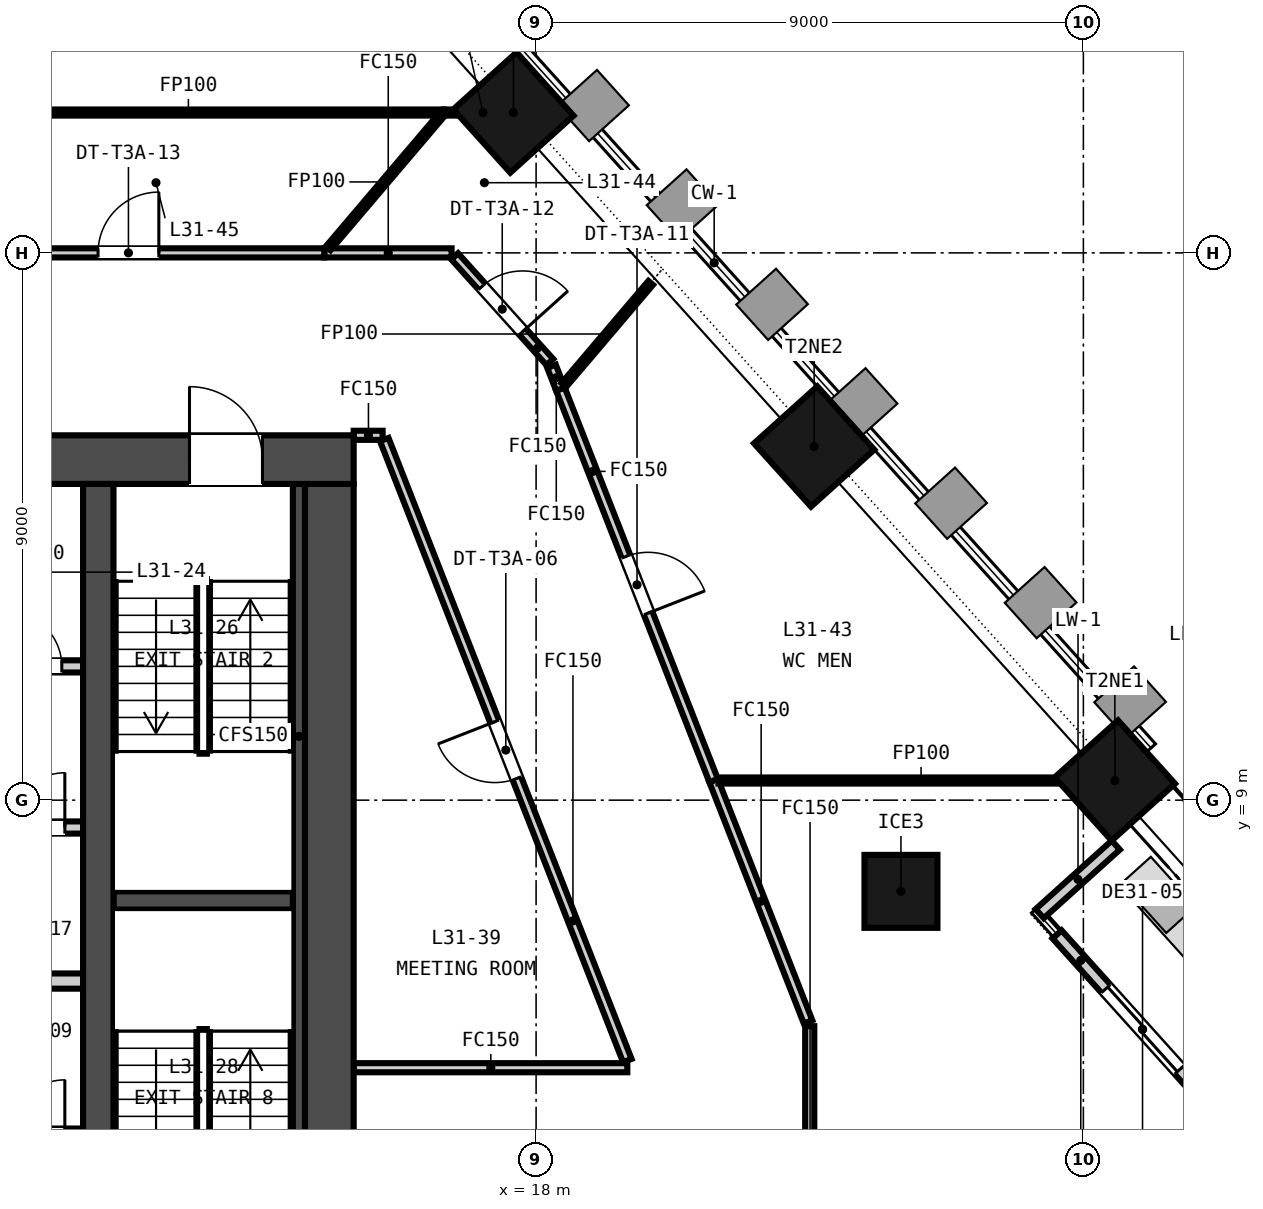
"""IFC4 building model, lengths in metres.
Left out: names, types, materials, properties, quantities, classifications, styles, units other than length and angle.
Written with IfcOpenShell. Run it as: python <this file> out.ifc"""

import sys

from ifc_helpers import new_model, si_unit, direction, frame, frame_2d, origin, origin_2d, place, context, subcontext, project, spatial, rectangle, extrude, element, fill, save


model = new_model("IFC4")
c1 = context("Model", 3, precision=1e-05, world=origin(), true_north=direction((0.0, 1.0)))
c2 = subcontext(c1, "Body", "Model", "MODEL_VIEW")
j1 = project(units=[si_unit("LENGTHUNIT", "METRE"), si_unit("PLANEANGLEUNIT", "RADIAN")], contexts=[c1])
p1 = place(None, origin())
s1 = spatial("IfcSite", under=j1, at=p1, CompositionType="ELEMENT")
p2 = place(p1, origin())
s2 = spatial("IfcBuilding", under=s1, at=p2, CompositionType="ELEMENT")
p3 = place(p2, frame((0.0, 0.0, 129.8)))
s3 = spatial("IfcBuildingStorey", under=s2, at=p3, CompositionType="ELEMENT", Elevation=129.8)
p4 = place(p3, frame((-15.0, 14.6, -0.15), z_axis=(0.0, 0.0, 1.0), x_axis=(1.0, 0.0, 0.0)))
e1 = element("IfcWall", 1, at=p4, inside=s3, PredefinedType="SOLIDWALL", context=c2, shape_type="SweptSolid", body=[
    extrude(rectangle(XDim=30.0, YDim=0.8, at=frame_2d((15.0, 0.0))), origin(), (0.0, 0.0, 1.0), 3.65),
])
p5 = place(p4, frame((9.25, 0.0, 0.15)))
e2 = element("IfcOpeningElement", 2, at=p5, cuts=e1, PredefinedType="OPENING", context=c2, shape_type="SweptSolid", body=[
    extrude(rectangle(XDim=1.5, YDim=2.1, at=frame_2d((0.75, 1.05))), frame((0.0, 0.41, 0.0), z_axis=(0.0, -1.0, 0.0), x_axis=(1.0, 0.0, 0.0)), (0.0, 0.0, 1.0), 0.82),
])
p6 = place(p4, frame((19.4, 0.0, 0.15)))
e3 = element("IfcOpeningElement", 3, at=p6, cuts=e1, PredefinedType="OPENING", context=c2, shape_type="SweptSolid", body=[
    extrude(rectangle(XDim=1.5, YDim=2.1, at=frame_2d((0.75, 1.05))), frame((0.0, 0.41, 0.0), z_axis=(0.0, -1.0, 0.0), x_axis=(1.0, 0.0, 0.0)), (0.0, 0.0, 1.0), 0.82),
])
p7 = place(p4, frame((1.5, 0.0, 0.15)))
e4 = element("IfcOpeningElement", 4, at=p7, cuts=e1, PredefinedType="OPENING", context=c2, shape_type="SweptSolid", body=[
    extrude(rectangle(XDim=1.2, YDim=2.1, at=frame_2d((0.6, 1.05))), frame((0.0, 0.41, 0.0), z_axis=(0.0, -1.0, 0.0), x_axis=(1.0, 0.0, 0.0)), (0.0, 0.0, 1.0), 0.82),
])
p8 = place(p4, frame((27.3, 0.0, 0.15)))
e5 = element("IfcOpeningElement", 5, at=p8, cuts=e1, PredefinedType="OPENING", context=c2, shape_type="SweptSolid", body=[
    extrude(rectangle(XDim=1.2, YDim=2.1, at=frame_2d((0.6, 1.05))), frame((0.0, 0.41, 0.0), z_axis=(0.0, -1.0, 0.0), x_axis=(1.0, 0.0, 0.0)), (0.0, 0.0, 1.0), 0.82),
])
p9 = place(p3, frame((14.6, 0.8, -0.15), z_axis=(0.0, 0.0, 1.0), x_axis=(0.0, 1.0, 0.0)))
e6 = element("IfcWall", 6, at=p9, inside=s3, PredefinedType="SOLIDWALL", context=c2, shape_type="SweptSolid", body=[
    extrude(rectangle(XDim=13.4, YDim=0.8, at=frame_2d((6.7, 0.0))), origin(), (0.0, 0.0, 1.0), 3.65),
])
p10 = place(p3, frame((10.8, 0.8, -0.15), z_axis=(0.0, 0.0, 1.0), x_axis=(0.0, 1.0, 0.0)))
e7 = element("IfcWall", 7, at=p10, inside=s3, PredefinedType="SOLIDWALL", context=c2, shape_type="SweptSolid", body=[
    extrude(rectangle(XDim=13.4, YDim=0.5, at=frame_2d((6.7, 0.0))), origin(), (0.0, 0.0, 1.0), 3.65),
])
for number, where, z_axis, x_axis in (
    (8, (27.518, 9.323, -0.15), (0.0, 0.0, 1.0), (-0.669, 0.743, 0.0)),
    (9, (22.573, 14.816, -0.15), (0.0, 0.0, 1.0), (-0.669, 0.743, 0.0)),
    (10, (17.627, 20.308, -0.15), (0.0, 0.0, 1.0), (-0.669, 0.743, 0.0)),
):
    element("IfcColumn", number, at=place(p3, frame(where, z_axis=z_axis, x_axis=x_axis)), inside=s3, PredefinedType="COLUMN", context=c2, shape_type="SweptSolid", body=[
        extrude(rectangle(XDim=1.4, YDim=1.4, at=origin_2d()), origin(), (0.0, 0.0, 1.0), 3.65),
    ])
p11 = place(p3, frame((24.0, 7.5, -0.15), z_axis=(0.0, 0.0, 1.0), x_axis=(1.0, 0.0, 0.0)))
e11 = element("IfcColumn", 11, at=p11, inside=s3, PredefinedType="COLUMN", context=c2, shape_type="SweptSolid", body=[
    extrude(rectangle(XDim=1.2, YDim=1.2, at=origin_2d()), origin(), (0.0, 0.0, 1.0), 3.65),
])
p12 = place(p3, frame((29.378, 3.67, 0.0), z_axis=(0.0, 0.0, 1.0), x_axis=(-0.669109235636, 0.743164067206, 0.0)))
e12 = element("IfcWall", 12, at=p12, inside=s3, PredefinedType="SOLIDWALL", context=c2, shape_type="SweptSolid", body=[
    extrude(rectangle(XDim=4.2, YDim=0.2, at=frame_2d((2.1, 0.0))), origin(), (0.0, 0.0, 1.0), 2.9),
])
p13 = place(p12, frame((1.2, 0.0, 0.0)))
e13 = element("IfcOpeningElement", 13, at=p13, cuts=e12, PredefinedType="OPENING", context=c2, shape_type="SweptSolid", body=[
    extrude(rectangle(XDim=1.8, YDim=2.4, at=frame_2d((0.9, 1.2))), frame((0.0, 0.11, 0.0), z_axis=(0.0, -1.0, 0.0), x_axis=(1.0, 0.0, 0.0)), (0.0, 0.0, 1.0), 0.22),
])
p14 = place(p3, frame((27.533, 8.26, 0.0), z_axis=(0.0, 0.0, 1.0), x_axis=(-0.743106699699, -0.6691729469, 0.0)))
e14 = element("IfcWall", 14, at=p14, inside=s3, PredefinedType="SOLIDWALL", context=c2, shape_type="SweptSolid", body=[
    extrude(rectangle(XDim=1.684, YDim=0.2, at=frame_2d((0.842, 0.0))), origin(), (0.0, 0.0, 1.0), 2.967),
])
p15 = place(p3, frame((-10.55, 6.025, 0.0), z_axis=(0.0, 0.0, 1.0), x_axis=(1.0, 0.0, 0.0)))
e15 = element("IfcWall", 15, at=p15, inside=s3, PredefinedType="PARTITIONING", context=c2, shape_type="SweptSolid", body=[
    extrude(rectangle(XDim=21.1, YDim=0.25, at=frame_2d((10.55, 0.0))), origin(), (0.0, 0.0, 1.0), 3.5),
])
p16 = place(p3, frame((-10.55, 8.55, 0.0), z_axis=(0.0, 0.0, 1.0), x_axis=(1.0, 0.0, 0.0)))
e16 = element("IfcWall", 16, at=p16, inside=s3, PredefinedType="PARTITIONING", context=c2, shape_type="SweptSolid", body=[
    extrude(rectangle(XDim=21.1, YDim=0.2, at=frame_2d((10.55, 0.0))), origin(), (0.0, 0.0, 1.0), 3.5),
])
p17 = place(p16, frame((0.675, 0.0, 0.0)))
e17 = element("IfcOpeningElement", 17, at=p17, cuts=e16, PredefinedType="OPENING", context=c2, shape_type="SweptSolid", body=[
    extrude(rectangle(XDim=1.2, YDim=2.1, at=frame_2d((0.6, 1.05))), frame((0.0, 0.11, 0.0), z_axis=(0.0, -1.0, 0.0), x_axis=(1.0, 0.0, 0.0)), (0.0, 0.0, 1.0), 0.22),
])
p18 = place(p16, frame((3.475, 0.0, 0.0)))
e18 = element("IfcOpeningElement", 18, at=p18, cuts=e16, PredefinedType="OPENING", context=c2, shape_type="SweptSolid", body=[
    extrude(rectangle(XDim=1.2, YDim=2.1, at=frame_2d((0.6, 1.05))), frame((0.0, 0.11, 0.0), z_axis=(0.0, -1.0, 0.0), x_axis=(1.0, 0.0, 0.0)), (0.0, 0.0, 1.0), 0.22),
])
p19 = place(p16, frame((6.275, 0.0, 0.0)))
e19 = element("IfcOpeningElement", 19, at=p19, cuts=e16, PredefinedType="OPENING", context=c2, shape_type="SweptSolid", body=[
    extrude(rectangle(XDim=1.2, YDim=2.1, at=frame_2d((0.6, 1.05))), frame((0.0, 0.11, 0.0), z_axis=(0.0, -1.0, 0.0), x_axis=(1.0, 0.0, 0.0)), (0.0, 0.0, 1.0), 0.22),
])
p20 = place(p16, frame((9.075, 0.0, 0.0)))
e20 = element("IfcOpeningElement", 20, at=p20, cuts=e16, PredefinedType="OPENING", context=c2, shape_type="SweptSolid", body=[
    extrude(rectangle(XDim=1.2, YDim=2.1, at=frame_2d((0.6, 1.05))), frame((0.0, 0.11, 0.0), z_axis=(0.0, -1.0, 0.0), x_axis=(1.0, 0.0, 0.0)), (0.0, 0.0, 1.0), 0.22),
])
p21 = place(p16, frame((11.875, 0.0, 0.0)))
e21 = element("IfcOpeningElement", 21, at=p21, cuts=e16, PredefinedType="OPENING", context=c2, shape_type="SweptSolid", body=[
    extrude(rectangle(XDim=1.2, YDim=2.1, at=frame_2d((0.6, 1.05))), frame((0.0, 0.11, 0.0), z_axis=(0.0, -1.0, 0.0), x_axis=(1.0, 0.0, 0.0)), (0.0, 0.0, 1.0), 0.22),
])
p22 = place(p16, frame((14.675, 0.0, 0.0)))
e22 = element("IfcOpeningElement", 22, at=p22, cuts=e16, PredefinedType="OPENING", context=c2, shape_type="SweptSolid", body=[
    extrude(rectangle(XDim=1.2, YDim=2.1, at=frame_2d((0.6, 1.05))), frame((0.0, 0.11, 0.0), z_axis=(0.0, -1.0, 0.0), x_axis=(1.0, 0.0, 0.0)), (0.0, 0.0, 1.0), 0.22),
])
p23 = place(p16, frame((17.475, 0.0, 0.0)))
e23 = element("IfcOpeningElement", 23, at=p23, cuts=e16, PredefinedType="OPENING", context=c2, shape_type="SweptSolid", body=[
    extrude(rectangle(XDim=1.2, YDim=2.1, at=frame_2d((0.6, 1.05))), frame((0.0, 0.11, 0.0), z_axis=(0.0, -1.0, 0.0), x_axis=(1.0, 0.0, 0.0)), (0.0, 0.0, 1.0), 0.22),
])
p24 = place(p16, frame((19.9, 0.0, 0.0)))
e24 = element("IfcOpeningElement", 24, at=p24, cuts=e16, PredefinedType="OPENING", context=c2, shape_type="SweptSolid", body=[
    extrude(rectangle(XDim=0.9, YDim=2.1, at=frame_2d((0.45, 1.05))), frame((0.0, 0.11, 0.0), z_axis=(0.0, -1.0, 0.0), x_axis=(1.0, 0.0, 0.0)), (0.0, 0.0, 1.0), 0.22),
])
p25 = place(p3, frame((5.9, 11.2, 0.0), z_axis=(0.0, 0.0, 1.0), x_axis=(1.0, 0.0, 0.0)))
e25 = element("IfcWall", 25, at=p25, inside=s3, PredefinedType="PARTITIONING", context=c2, shape_type="SweptSolid", body=[
    extrude(rectangle(XDim=4.65, YDim=0.2, at=frame_2d((2.325, 0.0))), origin(), (0.0, 0.0, 1.0), 3.5),
])
p26 = place(p25, frame((3.4, 0.0, 0.0)))
e26 = element("IfcOpeningElement", 26, at=p26, cuts=e25, PredefinedType="OPENING", context=c2, shape_type="SweptSolid", body=[
    extrude(rectangle(XDim=0.9, YDim=2.1, at=frame_2d((0.45, 1.05))), frame((0.0, 0.11, 0.0), z_axis=(0.0, -1.0, 0.0), x_axis=(1.0, 0.0, 0.0)), (0.0, 0.0, 1.0), 0.22),
])
p27 = place(p3, frame((11.05, 7.35, 0.0), z_axis=(0.0, 0.0, 1.0), x_axis=(1.0, 0.0, 0.0)))
e27 = element("IfcWall", 27, at=p27, inside=s3, PredefinedType="SOLIDWALL", context=c2, shape_type="SweptSolid", body=[
    extrude(rectangle(XDim=2.95, YDim=0.3, at=frame_2d((1.475, 0.0))), origin(), (0.0, 0.0, 1.0), 3.5),
])
p28 = place(p3, frame((14.1, 0.8, 0.0), z_axis=(0.0, 0.0, 1.0), x_axis=(0.0, 1.0, 0.0)))
e28 = element("IfcWall", 28, at=p28, inside=s3, PredefinedType="SOLIDWALL", context=c2, shape_type="SweptSolid", body=[
    extrude(rectangle(XDim=13.4, YDim=0.2, at=frame_2d((6.7, 0.0))), origin(), (0.0, 0.0, 1.0), 3.5),
])
p29 = place(p3, frame((15.476, 15.0, 0.0), z_axis=(0.0, 0.0, 1.0), x_axis=(-1.0, 0.0, 0.0)))
e29 = element("IfcWall", 29, at=p29, inside=s3, PredefinedType="PARTITIONING", context=c2, shape_type="SweptSolid", body=[
    extrude(rectangle(XDim=0.476, YDim=0.15, at=frame_2d((0.238, 0.0))), origin(), (0.0, 0.0, 1.0), 2.741),
])
p30 = place(p3, frame((19.5, 4.717, 0.0), z_axis=(0.0, 0.0, 1.0), x_axis=(-0.364410260026, 0.931238509936, 0.0)))
e30 = element("IfcWall", 30, at=p30, inside=s3, PredefinedType="PARTITIONING", context=c2, shape_type="SweptSolid", body=[
    extrude(rectangle(XDim=10.967, YDim=0.15, at=frame_2d((5.484, 0.0))), origin(), (0.0, 0.0, 1.0), 2.741),
])
p31 = place(p30, frame((4.984, 0.0, 0.0)))
e31 = element("IfcOpeningElement", 31, at=p31, cuts=e30, PredefinedType="OPENING", context=c2, shape_type="SweptSolid", body=[
    extrude(rectangle(XDim=1.0, YDim=2.1, at=frame_2d((0.5, 1.05))), frame((0.0, 0.085, 0.0), z_axis=(0.0, -1.0, 0.0), x_axis=(1.0, 0.0, 0.0)), (0.0, 0.0, 1.0), 0.17),
])
p32 = place(p3, frame((22.5, 5.283, 0.0), z_axis=(0.0, 0.0, 1.0), x_axis=(0.0, -1.0, 0.0)))
e32 = element("IfcWall", 32, at=p32, inside=s3, PredefinedType="PARTITIONING", context=c2, shape_type="SweptSolid", body=[
    extrude(rectangle(XDim=5.283, YDim=0.15, at=frame_2d((2.642, 0.0))), origin(), (0.0, 0.0, 1.0), 2.741),
])
p33 = place(p3, frame((16.479, 20.308, 0.0), z_axis=(0.0, 0.0, 1.0), x_axis=(1.0, 0.0, 0.0)))
e33 = element("IfcWall", 33, at=p33, inside=s3, PredefinedType="PARTITIONING", context=c2, shape_type="SweptSolid", body=[
    extrude(rectangle(XDim=1.283, YDim=0.1, at=frame_2d((0.642, 0.0))), origin(), (0.0, 0.0, 1.0), 2.741),
])
p34 = place(p3, frame((8.075, 20.308, 0.0), z_axis=(0.0, 0.0, 1.0), x_axis=(1.0, 0.0, 0.0)))
e34 = element("IfcWall", 34, at=p34, inside=s3, PredefinedType="PARTITIONING", context=c2, shape_type="SweptSolid", body=[
    extrude(rectangle(XDim=8.404, YDim=0.1, at=frame_2d((4.202, 0.0))), origin(), (0.0, 0.0, 1.0), 2.741),
])
p35 = place(p3, frame((15.0, 4.6, 0.0), z_axis=(0.0, 0.0, 1.0), x_axis=(1.0, 0.0, 0.0)))
e35 = element("IfcWall", 35, at=p35, inside=s3, PredefinedType="PARTITIONING", context=c2, shape_type="SweptSolid", body=[
    extrude(rectangle(XDim=4.5, YDim=0.15, at=frame_2d((2.25, 0.0))), origin(), (0.0, 0.0, 1.0), 2.741),
])
p36 = place(p3, frame((20.919, 9.323, 0.0), z_axis=(0.0, 0.0, 1.0), x_axis=(0.364429576393, -0.931230950865, 0.0)))
e36 = element("IfcWall", 36, at=p36, inside=s3, PredefinedType="PARTITIONING", context=c2, shape_type="SweptSolid", body=[
    extrude(rectangle(XDim=4.263, YDim=0.15, at=frame_2d((2.132, 0.0))), origin(), (0.0, 0.0, 1.0), 2.741),
])
p37 = place(p3, frame((18.4, 15.76, 0.0), z_axis=(0.0, 0.0, 1.0), x_axis=(0.364425982763, -0.931232357195, 0.0)))
e37 = element("IfcWall", 37, at=p37, inside=s3, PredefinedType="PARTITIONING", context=c2, shape_type="SweptSolid", body=[
    extrude(rectangle(XDim=6.912, YDim=0.15, at=frame_2d((3.456, 0.0))), origin(), (0.0, 0.0, 1.0), 2.741),
])
p38 = place(p37, frame((2.956, 0.0, 0.0)))
e38 = element("IfcOpeningElement", 38, at=p38, cuts=e37, PredefinedType="OPENING", context=c2, shape_type="SweptSolid", body=[
    extrude(rectangle(XDim=1.0, YDim=2.1, at=frame_2d((0.5, 1.05))), frame((0.0, 0.085, 0.0), z_axis=(0.0, -1.0, 0.0), x_axis=(1.0, 0.0, 0.0)), (0.0, 0.0, 1.0), 0.17),
])
p39 = place(p3, frame((21.0, 9.323, 0.0), z_axis=(0.0, 0.0, 1.0), x_axis=(1.0, 0.0, 0.0)))
e39 = element("IfcWall", 39, at=p39, inside=s3, PredefinedType="PARTITIONING", context=c2, shape_type="SweptSolid", body=[
    extrude(rectangle(XDim=6.653, YDim=0.1, at=frame_2d((3.326, 0.0))), origin(), (0.0, 0.0, 1.0), 2.741),
])
p40 = place(p3, frame((14.517, 18.0, 0.0), z_axis=(0.0, 0.0, 1.0), x_axis=(1.0, 0.0, 0.0)))
e40 = element("IfcWall", 40, at=p40, inside=s3, PredefinedType="PARTITIONING", context=c2, shape_type="SweptSolid", body=[
    extrude(rectangle(XDim=2.093, YDim=0.15, at=frame_2d((1.046, 0.0))), origin(), (0.0, 0.0, 1.0), 2.741),
])
p41 = place(p3, frame((16.66, 17.944, 0.0), z_axis=(0.0, 0.0, 1.0), x_axis=(0.669103043777, -0.743169642012, 0.0)))
e41 = element("IfcWall", 41, at=p41, inside=s3, PredefinedType="PARTITIONING", context=c2, shape_type="SweptSolid", body=[
    extrude(rectangle(XDim=2.34, YDim=0.15, at=frame_2d((1.17, 0.0))), origin(), (0.0, 0.0, 1.0), 2.741),
])
p42 = place(p41, frame((0.67, 0.0, 0.0)))
e42 = element("IfcOpeningElement", 42, at=p42, cuts=e41, PredefinedType="OPENING", context=c2, shape_type="SweptSolid", body=[
    extrude(rectangle(XDim=1.0, YDim=2.1, at=frame_2d((0.5, 1.05))), frame((0.0, 0.085, 0.0), z_axis=(0.0, -1.0, 0.0), x_axis=(1.0, 0.0, 0.0)), (0.0, 0.0, 1.0), 0.17),
])
p43 = place(p3, frame((18.253, 16.135, 0.0), z_axis=(0.0, 0.0, 1.0), x_axis=(0.36385052714, -0.93145734948, 0.0)))
e43 = element("IfcWall", 43, at=p43, inside=s3, PredefinedType="PARTITIONING", context=c2, shape_type="SweptSolid", body=[
    extrude(rectangle(XDim=0.403, YDim=0.15, at=frame_2d((0.201, 0.0))), origin(), (0.0, 0.0, 1.0), 2.741),
])
p44 = place(p3, frame((18.455, 15.825, 0.0), z_axis=(0.0, 0.0, 1.0), x_axis=(0.647780060511, 0.761827403815, 0.0)))
e44 = element("IfcWall", 44, at=p44, inside=s3, PredefinedType="PARTITIONING", context=c2, shape_type="SweptSolid", body=[
    extrude(rectangle(XDim=2.207, YDim=0.1, at=frame_2d((1.104, 0.0))), origin(), (0.0, 0.0, 1.0), 2.741),
])
p45 = place(p3, frame((8.075, 18.0, 0.0), z_axis=(0.0, 0.0, 1.0), x_axis=(1.0, 0.0, 0.0)))
e45 = element("IfcWall", 45, at=p45, inside=s3, PredefinedType="PARTITIONING", context=c2, shape_type="SweptSolid", body=[
    extrude(rectangle(XDim=6.442, YDim=0.15, at=frame_2d((3.221, 0.0))), origin(), (0.0, 0.0, 1.0), 2.741),
])
p46 = place(p45, frame((2.721, 0.0, 0.0)))
e46 = element("IfcOpeningElement", 46, at=p46, cuts=e45, PredefinedType="OPENING", context=c2, shape_type="SweptSolid", body=[
    extrude(rectangle(XDim=1.0, YDim=2.1, at=frame_2d((0.5, 1.05))), frame((0.0, 0.085, 0.0), z_axis=(0.0, -1.0, 0.0), x_axis=(1.0, 0.0, 0.0)), (0.0, 0.0, 1.0), 0.17),
])
p47 = place(p3, frame((14.581, 18.075, 0.0), z_axis=(0.0, 0.0, 1.0), x_axis=(0.6476632602, 0.761926703422, 0.0)))
e47 = element("IfcWall", 47, at=p47, inside=s3, PredefinedType="PARTITIONING", context=c2, shape_type="SweptSolid", body=[
    extrude(rectangle(XDim=2.865, YDim=0.1, at=frame_2d((1.433, 0.0))), origin(), (0.0, 0.0, 1.0), 2.741),
])
p48 = place(p13, origin())
e48 = element("IfcDoor", 48, at=p48, inside=s3, OperationType="SINGLE_SWING_LEFT", PredefinedType="DOOR", context=c2, shape_type="SweptSolid", body=[
    extrude(rectangle(XDim=1.8, YDim=2.4, at=frame_2d((0.9, 1.2))), frame((0.0, 0.025, 0.0), z_axis=(0.0, -1.0, 0.0), x_axis=(1.0, 0.0, 0.0)), (0.0, 0.0, 1.0), 0.05),
])
fill(e13, e48)
p49 = place(p24, origin())
e49 = element("IfcDoor", 49, at=p49, inside=s3, OperationType="SINGLE_SWING_RIGHT", PredefinedType="DOOR", context=c2, shape_type="SweptSolid", body=[
    extrude(rectangle(XDim=0.9, YDim=2.1, at=frame_2d((0.45, 1.05))), frame((0.0, 0.025, 0.0), z_axis=(0.0, -1.0, 0.0), x_axis=(1.0, 0.0, 0.0)), (0.0, 0.0, 1.0), 0.05),
])
fill(e24, e49)
p50 = place(p26, origin())
e50 = element("IfcDoor", 50, at=p50, inside=s3, OperationType="SINGLE_SWING_LEFT", PredefinedType="DOOR", context=c2, shape_type="SweptSolid", body=[
    extrude(rectangle(XDim=0.9, YDim=2.1, at=frame_2d((0.45, 1.05))), frame((0.0, 0.025, 0.0), z_axis=(0.0, -1.0, 0.0), x_axis=(1.0, 0.0, 0.0)), (0.0, 0.0, 1.0), 0.05),
])
fill(e26, e50)
p51 = place(p8, origin())
e51 = element("IfcDoor", 51, at=p51, inside=s3, OperationType="SINGLE_SWING_LEFT", PredefinedType="DOOR", context=c2, shape_type="SweptSolid", body=[
    extrude(rectangle(XDim=1.2, YDim=2.1, at=frame_2d((0.6, 1.05))), frame((0.0, 0.025, 0.0), z_axis=(0.0, -1.0, 0.0), x_axis=(1.0, 0.0, 0.0)), (0.0, 0.0, 1.0), 0.05),
])
fill(e5, e51)
p52 = place(p31, origin())
e52 = element("IfcDoor", 52, at=p52, inside=s3, OperationType="SINGLE_SWING_RIGHT", PredefinedType="DOOR", context=c2, shape_type="SweptSolid", body=[
    extrude(rectangle(XDim=1.0, YDim=2.1, at=frame_2d((0.5, 1.05))), frame((0.0, 0.025, 0.0), z_axis=(0.0, -1.0, 0.0), x_axis=(1.0, 0.0, 0.0)), (0.0, 0.0, 1.0), 0.05),
])
fill(e31, e52)
p53 = place(p38, origin())
e53 = element("IfcDoor", 53, at=p53, inside=s3, OperationType="SINGLE_SWING_RIGHT", PredefinedType="DOOR", context=c2, shape_type="SweptSolid", body=[
    extrude(rectangle(XDim=1.0, YDim=2.1, at=frame_2d((0.5, 1.05))), frame((0.0, 0.025, 0.0), z_axis=(0.0, -1.0, 0.0), x_axis=(1.0, 0.0, 0.0)), (0.0, 0.0, 1.0), 0.05),
])
fill(e38, e53)
p54 = place(p42, origin())
e54 = element("IfcDoor", 54, at=p54, inside=s3, OperationType="SINGLE_SWING_RIGHT", PredefinedType="DOOR", context=c2, shape_type="SweptSolid", body=[
    extrude(rectangle(XDim=1.0, YDim=2.1, at=frame_2d((0.5, 1.05))), frame((0.0, 0.025, 0.0), z_axis=(0.0, -1.0, 0.0), x_axis=(1.0, 0.0, 0.0)), (0.0, 0.0, 1.0), 0.05),
])
fill(e42, e54)
p55 = place(p46, origin())
e55 = element("IfcDoor", 55, at=p55, inside=s3, OperationType="SINGLE_SWING_RIGHT", PredefinedType="DOOR", context=c2, shape_type="SweptSolid", body=[
    extrude(rectangle(XDim=1.0, YDim=2.1, at=frame_2d((0.5, 1.05))), frame((0.0, 0.025, 0.0), z_axis=(0.0, -1.0, 0.0), x_axis=(1.0, 0.0, 0.0)), (0.0, 0.0, 1.0), 0.05),
])
fill(e46, e55)
save(model, sys.argv[1])
